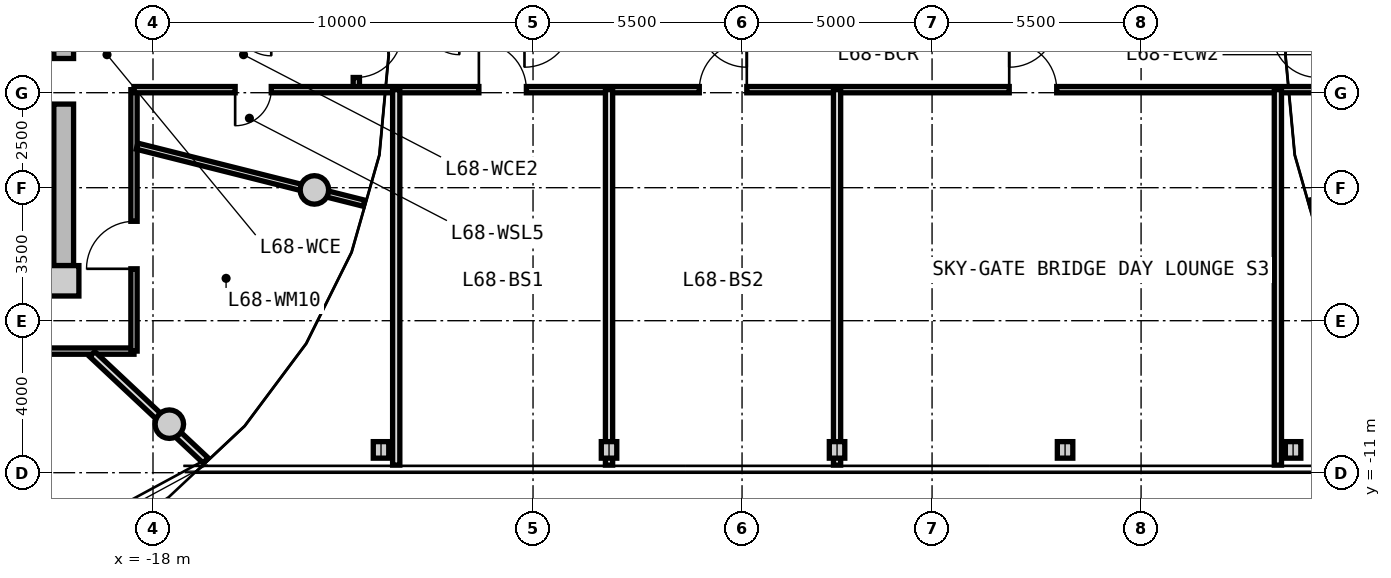
"""IFC4 building model, lengths in metres.
Left out: names, types, materials, properties, quantities, classifications, styles, units other than length and angle.
Written with IfcOpenShell. Run it as: python <this file> out.ifc"""

import sys

from ifc_helpers import new_model, si_unit, direction, frame, frame_2d, origin, origin_2d, place, context, subcontext, project, spatial, rectangle, circle, i_section, extrude, source, transform, mapped, element, fill, save


model = new_model("IFC4")
c1 = context("Model", 3, precision=1e-05, world=origin(), true_north=direction((0.0, 1.0)))
c2 = subcontext(c1, "Body", "Model", "MODEL_VIEW")
j1 = project(units=[si_unit("LENGTHUNIT", "METRE"), si_unit("PLANEANGLEUNIT", "RADIAN")], contexts=[c1])
p1 = place(None, origin())
s1 = spatial("IfcSite", under=j1, at=p1, CompositionType="ELEMENT")
p2 = place(p1, origin())
s2 = spatial("IfcBuilding", under=s1, at=p2, CompositionType="ELEMENT")
p3 = place(p2, frame((0.0, 0.0, 220.0)))
s3 = spatial("IfcBuildingStorey", under=s2, at=p3, CompositionType="ELEMENT", Elevation=220.0)
m1 = source(origin(), c2, "Body", "SweptSolid", [
    extrude(rectangle(XDim=0.8, YDim=0.8, at=origin_2d()), origin(), (0.0, 0.0, 1.0), 3.05),
])
p4 = place(p3, frame((-20.35, -5.95, 0.0), z_axis=(0.0, 0.0, 1.0), x_axis=(1.0, 0.0, 0.0)))
e1 = element("IfcColumn", 1, at=p4, inside=s3, PredefinedType="COLUMN", context=c2, shape_type="MappedRepresentation", body=[
    mapped(m1, transform((0.0, 0.0, 0.0), x_axis=(1.0, 0.0, 0.0), y_axis=(0.0, 1.0, 0.0), z_axis=(0.0, 0.0, 1.0), scale=1.0)),
])
m2 = source(origin(), c2, "Body", "SweptSolid", [
    extrude(rectangle(XDim=11.1, YDim=0.52, at=frame_2d((5.55, 0.0))), origin(), (0.0, 0.0, 1.0), 2.76),
])
p5 = place(p3, frame((-20.35, 5.55, 0.0), z_axis=(0.0, 0.0, 1.0), x_axis=(0.0, -1.0, 0.0)))
e2 = element("IfcWall", 2, at=p5, inside=s3, PredefinedType="SHEAR", context=c2, shape_type="MappedRepresentation", body=[
    mapped(m2, transform((0.0, 0.0, 0.0), x_axis=(1.0, 0.0, 0.0), y_axis=(0.0, 1.0, 0.0), z_axis=(0.0, 0.0, 1.0), scale=1.0)),
])
p6 = place(p5, frame((5.65, 0.0, 0.0)))
e3 = element("IfcOpeningElement", 3, at=p6, cuts=e2, PredefinedType="OPENING", context=c2, shape_type="SweptSolid", body=[
    extrude(rectangle(XDim=1.2, YDim=2.15, at=frame_2d((0.6, 1.075))), frame((0.0, 0.27, 0.0), z_axis=(0.0, -1.0, 0.0), x_axis=(1.0, 0.0, 0.0)), (0.0, 0.0, 1.0), 0.54),
])
m3 = source(origin(), c2, "Body", "SweptSolid", [
    extrude(circle(Radius=0.375, at=origin_2d()), origin(), (0.0, 0.0, 1.0), 3.05),
])
for number, where, z_axis, x_axis in (
    (4, (-17.57, -9.723, 0.0), (0.0, 0.0, 1.0), (1.0, 0.0, 0.0)),
    (5, (-13.753, -3.559, 0.0), (0.0, 0.0, 1.0), (1.0, 0.0, 0.0)),
):
    element("IfcColumn", number, at=place(p3, frame(where, z_axis=z_axis, x_axis=x_axis)), inside=s3, PredefinedType="COLUMN", context=c2, shape_type="MappedRepresentation", body=[
        mapped(m3, transform((0.0, 0.0, 0.0), x_axis=(1.0, 0.0, 0.0), y_axis=(0.0, 1.0, 0.0), z_axis=(0.0, 0.0, 1.0), scale=1.0)),
    ])
m4 = source(origin(), c2, "Body", "SweptSolid", [
    extrude(i_section(OverallWidth=0.407, OverallDepth=0.435, WebThickness=0.024, FlangeThickness=0.039, FilletRadius=0.015, at=origin_2d()), origin(), (0.0, 0.0, 1.0), 3.05),
])
for number, where, z_axis, x_axis in (
    (6, (-12.0, -10.4, 0.0), (0.0, 0.0, 1.0), (1.0, 0.0, 0.0)),
    (7, (-6.0, -10.4, 0.0), (0.0, 0.0, 1.0), (1.0, 0.0, 0.0)),
    (8, (0.0, -10.4, 0.0), (0.0, 0.0, 1.0), (1.0, 0.0, 0.0)),
    (9, (6.0, -10.4, 0.0), (0.0, 0.0, 1.0), (1.0, 0.0, 0.0)),
    (10, (12.0, -10.4, 0.0), (0.0, 0.0, 1.0), (1.0, 0.0, 0.0)),
):
    element("IfcColumn", number, at=place(p3, frame(where, z_axis=z_axis, x_axis=x_axis)), inside=s3, PredefinedType="COLUMN", context=c2, shape_type="MappedRepresentation", body=[
        mapped(m4, transform((0.0, 0.0, 0.0), x_axis=(1.0, 0.0, 0.0), y_axis=(0.0, 1.0, 0.0), z_axis=(0.0, 0.0, 1.0), scale=1.0)),
    ])
m5 = source(origin(), c2, "Body", "SweptSolid", [
    extrude(rectangle(XDim=19.0, YDim=0.165, at=frame_2d((9.5, 0.0))), origin(), (0.0, 0.0, 1.0), 2.745),
])
p7 = place(p3, frame((-18.5, -7.8, 0.0), z_axis=(0.0, 0.0, 1.0), x_axis=(-1.0, 0.0, 0.0)))
e11 = element("IfcWall", 11, at=p7, inside=s3, PredefinedType="PARTITIONING", context=c2, shape_type="MappedRepresentation", body=[
    mapped(m5, transform((0.0, 0.0, 0.0), x_axis=(1.0, 0.0, 0.0), y_axis=(0.0, 1.0, 0.0), z_axis=(0.0, 0.0, 1.0), scale=1.0)),
])
p8 = place(p7, frame((14.191, 0.0, 0.0)))
e12 = element("IfcOpeningElement", 12, at=p8, cuts=e11, PredefinedType="OPENING", context=c2, shape_type="SweptSolid", body=[
    extrude(rectangle(XDim=1.25, YDim=2.2, at=frame_2d((0.625, 1.1))), frame((0.0, 0.093, 0.0), z_axis=(0.0, -1.0, 0.0), x_axis=(1.0, 0.0, 0.0)), (0.0, 0.0, 1.0), 0.185),
])
p9 = place(p7, frame((8.875, 0.0, 0.0)))
e13 = element("IfcOpeningElement", 13, at=p9, cuts=e11, PredefinedType="OPENING", context=c2, shape_type="SweptSolid", body=[
    extrude(rectangle(XDim=1.25, YDim=2.2, at=frame_2d((0.625, 1.1))), frame((0.0, 0.093, 0.0), z_axis=(0.0, -1.0, 0.0), x_axis=(1.0, 0.0, 0.0)), (0.0, 0.0, 1.0), 0.185),
])
p10 = place(p7, frame((3.559, 0.0, 0.0)))
e14 = element("IfcOpeningElement", 14, at=p10, cuts=e11, PredefinedType="OPENING", context=c2, shape_type="SweptSolid", body=[
    extrude(rectangle(XDim=1.25, YDim=2.2, at=frame_2d((0.625, 1.1))), frame((0.0, 0.093, 0.0), z_axis=(0.0, -1.0, 0.0), x_axis=(1.0, 0.0, 0.0)), (0.0, 0.0, 1.0), 0.185),
])
m6 = source(origin(), c2, "Body", "SweptSolid", [
    extrude(rectangle(XDim=6.88, YDim=0.165, at=frame_2d((3.44, 0.0))), origin(), (0.0, 0.0, 1.0), 2.745),
])
p11 = place(p3, frame((-18.5, -0.92, 0.0), z_axis=(0.0, 0.0, 1.0), x_axis=(0.0, -1.0, 0.0)))
e15 = element("IfcWall", 15, at=p11, inside=s3, PredefinedType="PARTITIONING", context=c2, shape_type="MappedRepresentation", body=[
    mapped(m6, transform((0.0, 0.0, 0.0), x_axis=(1.0, 0.0, 0.0), y_axis=(0.0, 1.0, 0.0), z_axis=(0.0, 0.0, 1.0), scale=1.0)),
])
p12 = place(p11, frame((3.464, 0.0, 0.0)))
e16 = element("IfcOpeningElement", 16, at=p12, cuts=e15, PredefinedType="OPENING", context=c2, shape_type="SweptSolid", body=[
    extrude(rectangle(XDim=1.25, YDim=2.2, at=frame_2d((0.625, 1.1))), frame((0.0, 0.093, 0.0), z_axis=(0.0, -1.0, 0.0), x_axis=(1.0, 0.0, 0.0)), (0.0, 0.0, 1.0), 0.185),
])
m7 = source(origin(), c2, "Body", "SweptSolid", [
    extrude(rectangle(XDim=6.157, YDim=0.165, at=frame_2d((3.079, 0.0))), origin(), (0.0, 0.0, 1.0), 2.345),
])
p13 = place(p3, frame((-18.42, -2.407, 0.0), z_axis=(0.0, 0.0, 1.0), x_axis=(0.969840867184, -0.243738984038, 0.0)))
e17 = element("IfcWall", 17, at=p13, inside=s3, PredefinedType="PARTITIONING", context=c2, shape_type="MappedRepresentation", body=[
    mapped(m7, transform((0.0, 0.0, 0.0), x_axis=(1.0, 0.0, 0.0), y_axis=(0.0, 1.0, 0.0), z_axis=(0.0, 0.0, 1.0), scale=1.0)),
])
m8 = source(origin(), c2, "Body", "SweptSolid", [
    extrude(rectangle(XDim=4.089, YDim=0.19, at=frame_2d((2.044, 0.0))), origin(), (0.0, 0.0, 1.0), 2.345),
])
p14 = place(p3, frame((-19.598, -7.88, 0.0), z_axis=(0.0, 0.0, 1.0), x_axis=(0.729401273609, -0.684086092577, 0.0)))
e18 = element("IfcWall", 18, at=p14, inside=s3, PredefinedType="PARTITIONING", context=c2, shape_type="MappedRepresentation", body=[
    mapped(m8, transform((0.0, 0.0, 0.0), x_axis=(1.0, 0.0, 0.0), y_axis=(0.0, 1.0, 0.0), z_axis=(0.0, 0.0, 1.0), scale=1.0)),
])
p15 = place(p3, frame((18.42, -2.407, 0.0), z_axis=(0.0, 0.0, 1.0), x_axis=(-0.969840867184, -0.243738984038, 0.0)))
e19 = element("IfcWall", 19, at=p15, inside=s3, PredefinedType="PARTITIONING", context=c2, shape_type="MappedRepresentation", body=[
    mapped(m7, transform((0.0, 0.0, 0.0), x_axis=(1.0, 0.0, 0.0), y_axis=(0.0, 1.0, 0.0), z_axis=(0.0, 0.0, 1.0), scale=1.0)),
])
m9 = source(origin(), c2, "Body", "SweptSolid", [
    extrude(rectangle(XDim=1.84, YDim=0.165, at=frame_2d((0.92, 0.0))), origin(), (0.0, 0.0, 1.0), 2.745),
])
p16 = place(p3, frame((-12.65, -0.92, 0.0), z_axis=(0.0, 0.0, 1.0), x_axis=(0.0, 1.0, 0.0)))
e20 = element("IfcWall", 20, at=p16, inside=s3, PredefinedType="PARTITIONING", context=c2, shape_type="MappedRepresentation", body=[
    mapped(m9, transform((0.0, 0.0, 0.0), x_axis=(1.0, 0.0, 0.0), y_axis=(0.0, 1.0, 0.0), z_axis=(0.0, 0.0, 1.0), scale=1.0)),
])
p17 = place(p16, frame((0.32, 0.0, 0.0)))
e21 = element("IfcOpeningElement", 21, at=p17, cuts=e20, PredefinedType="OPENING", context=c2, shape_type="SweptSolid", body=[
    extrude(rectangle(XDim=1.2, YDim=2.15, at=frame_2d((0.6, 1.075))), frame((0.0, 0.093, 0.0), z_axis=(0.0, -1.0, 0.0), x_axis=(1.0, 0.0, 0.0)), (0.0, 0.0, 1.0), 0.185),
])
m10 = source(origin(), c2, "Body", "SweptSolid", [
    extrude(rectangle(XDim=37.0, YDim=0.165, at=frame_2d((18.5, 0.0))), origin(), (0.0, 0.0, 1.0), 2.745),
])
p18 = place(p3, frame((-18.5, -0.92, 0.0), z_axis=(0.0, 0.0, 1.0), x_axis=(1.0, 0.0, 0.0)))
e22 = element("IfcWall", 22, at=p18, inside=s3, PredefinedType="PARTITIONING", context=c2, shape_type="MappedRepresentation", body=[
    mapped(m10, transform((0.0, 0.0, 0.0), x_axis=(1.0, 0.0, 0.0), y_axis=(0.0, 1.0, 0.0), z_axis=(0.0, 0.0, 1.0), scale=1.0)),
])
p19 = place(p18, frame((2.662, 0.0, 0.0)))
e23 = element("IfcOpeningElement", 23, at=p19, cuts=e22, PredefinedType="OPENING", context=c2, shape_type="SweptSolid", body=[
    extrude(rectangle(XDim=0.95, YDim=2.1, at=frame_2d((0.475, 1.05))), frame((0.0, 0.093, 0.0), z_axis=(0.0, -1.0, 0.0), x_axis=(1.0, 0.0, 0.0)), (0.0, 0.0, 1.0), 0.185),
])
p20 = place(p18, frame((33.388, 0.0, 0.0)))
e24 = element("IfcOpeningElement", 24, at=p20, cuts=e22, PredefinedType="OPENING", context=c2, shape_type="SweptSolid", body=[
    extrude(rectangle(XDim=0.95, YDim=2.1, at=frame_2d((0.475, 1.05))), frame((0.0, 0.093, 0.0), z_axis=(0.0, -1.0, 0.0), x_axis=(1.0, 0.0, 0.0)), (0.0, 0.0, 1.0), 0.185),
])
p21 = place(p18, frame((9.075, 0.0, 0.0)))
e25 = element("IfcOpeningElement", 25, at=p21, cuts=e22, PredefinedType="OPENING", context=c2, shape_type="SweptSolid", body=[
    extrude(rectangle(XDim=1.25, YDim=2.2, at=frame_2d((0.625, 1.1))), frame((0.0, 0.093, 0.0), z_axis=(0.0, -1.0, 0.0), x_axis=(1.0, 0.0, 0.0)), (0.0, 0.0, 1.0), 0.185),
])
p22 = place(p18, frame((14.875, 0.0, 0.0)))
e26 = element("IfcOpeningElement", 26, at=p22, cuts=e22, PredefinedType="OPENING", context=c2, shape_type="SweptSolid", body=[
    extrude(rectangle(XDim=1.25, YDim=2.2, at=frame_2d((0.625, 1.1))), frame((0.0, 0.093, 0.0), z_axis=(0.0, -1.0, 0.0), x_axis=(1.0, 0.0, 0.0)), (0.0, 0.0, 1.0), 0.185),
])
p23 = place(p18, frame((23.03, 0.0, 0.0)))
e27 = element("IfcOpeningElement", 27, at=p23, cuts=e22, PredefinedType="OPENING", context=c2, shape_type="SweptSolid", body=[
    extrude(rectangle(XDim=1.25, YDim=2.2, at=frame_2d((0.625, 1.1))), frame((0.0, 0.093, 0.0), z_axis=(0.0, -1.0, 0.0), x_axis=(1.0, 0.0, 0.0)), (0.0, 0.0, 1.0), 0.185),
])
m11 = source(origin(), c2, "Body", "SweptSolid", [
    extrude(rectangle(XDim=9.88, YDim=0.19, at=frame_2d((4.94, 0.0))), origin(), (0.0, 0.0, 1.0), 2.745),
])
for number, where, z_axis, x_axis in (
    (28, (-11.6, -10.8, 0.0), (0.0, 0.0, 1.0), (0.0, 1.0, 0.0)),
    (29, (11.6, -10.8, 0.0), (0.0, 0.0, 1.0), (0.0, 1.0, 0.0)),
):
    element("IfcWall", number, at=place(p3, frame(where, z_axis=z_axis, x_axis=x_axis)), inside=s3, PredefinedType="PARTITIONING", context=c2, shape_type="MappedRepresentation", body=[
        mapped(m11, transform((0.0, 0.0, 0.0), x_axis=(1.0, 0.0, 0.0), y_axis=(0.0, 1.0, 0.0), z_axis=(0.0, 0.0, 1.0), scale=1.0)),
    ])
m12 = source(origin(), c2, "Body", "SweptSolid", [
    extrude(rectangle(XDim=9.88, YDim=0.19, at=frame_2d((4.94, 0.0))), origin(), (0.0, 0.0, 1.0), 2.045),
])
for number, where, z_axis, x_axis in (
    (30, (-6.0, -10.8, 0.0), (0.0, 0.0, 1.0), (0.0, 1.0, 0.0)),
    (31, (0.0, -10.8, 0.0), (0.0, 0.0, 1.0), (0.0, 1.0, 0.0)),
):
    element("IfcWall", number, at=place(p3, frame(where, z_axis=z_axis, x_axis=x_axis)), inside=s3, PredefinedType="PARTITIONING", context=c2, shape_type="MappedRepresentation", body=[
        mapped(m12, transform((0.0, 0.0, 0.0), x_axis=(1.0, 0.0, 0.0), y_axis=(0.0, 1.0, 0.0), z_axis=(0.0, 0.0, 1.0), scale=1.0)),
    ])
m13 = source(origin(), c2, "Body", "SweptSolid", [
    extrude(rectangle(XDim=1.2, YDim=2.15, at=frame_2d((0.6, 1.075))), frame((0.0, 0.025, 0.0), z_axis=(0.0, -1.0, 0.0), x_axis=(1.0, 0.0, 0.0)), (0.0, 0.0, 1.0), 0.05),
])
p24 = place(p6, frame((1.2, 0.0, 0.0), z_axis=(0.0, 0.0, 1.0), x_axis=(-1.0, 0.0, 0.0)))
e32 = element("IfcDoor", 32, at=p24, inside=s3, OperationType="SINGLE_SWING_RIGHT", PredefinedType="DOOR", context=c2, shape_type="MappedRepresentation", body=[
    mapped(m13, transform((0.0, 0.0, 0.0), x_axis=(1.0, 0.0, 0.0), y_axis=(0.0, 1.0, 0.0), z_axis=(0.0, 0.0, 1.0), scale=1.0)),
])
fill(e3, e32)
m14 = source(origin(), c2, "Body", "SweptSolid", [
    extrude(rectangle(XDim=0.95, YDim=2.1, at=frame_2d((0.475, 1.05))), frame((0.0, 0.025, 0.0), z_axis=(0.0, -1.0, 0.0), x_axis=(1.0, 0.0, 0.0)), (0.0, 0.0, 1.0), 0.05),
])
p25 = place(p19, frame((0.95, 0.0, 0.0), z_axis=(0.0, 0.0, 1.0), x_axis=(-1.0, 0.0, 0.0)))
e33 = element("IfcDoor", 33, at=p25, inside=s3, OperationType="SINGLE_SWING_RIGHT", PredefinedType="DOOR", context=c2, shape_type="MappedRepresentation", body=[
    mapped(m14, transform((0.0, 0.0, 0.0), x_axis=(1.0, 0.0, 0.0), y_axis=(0.0, 1.0, 0.0), z_axis=(0.0, 0.0, 1.0), scale=1.0)),
])
fill(e23, e33)
m15 = source(origin(), c2, "Body", "SweptSolid", [
    extrude(rectangle(XDim=1.25, YDim=2.2, at=frame_2d((0.625, 1.1))), frame((0.0, 0.025, 0.0), z_axis=(0.0, -1.0, 0.0), x_axis=(1.0, 0.0, 0.0)), (0.0, 0.0, 1.0), 0.05),
])
p26 = place(p12, frame((1.25, 0.0, 0.0), z_axis=(0.0, 0.0, 1.0), x_axis=(-1.0, 0.0, 0.0)))
e34 = element("IfcDoor", 34, at=p26, inside=s3, OperationType="SINGLE_SWING_LEFT", PredefinedType="DOOR", context=c2, shape_type="MappedRepresentation", body=[
    mapped(m15, transform((0.0, 0.0, 0.0), x_axis=(1.0, 0.0, 0.0), y_axis=(0.0, 1.0, 0.0), z_axis=(0.0, 0.0, 1.0), scale=1.0)),
])
fill(e16, e34)
p27 = place(p17, frame((1.2, 0.0, 0.0), z_axis=(0.0, 0.0, 1.0), x_axis=(-1.0, 0.0, 0.0)))
e35 = element("IfcDoor", 35, at=p27, inside=s3, OperationType="SINGLE_SWING_LEFT", PredefinedType="DOOR", context=c2, shape_type="MappedRepresentation", body=[
    mapped(m13, transform((0.0, 0.0, 0.0), x_axis=(1.0, 0.0, 0.0), y_axis=(0.0, 1.0, 0.0), z_axis=(0.0, 0.0, 1.0), scale=1.0)),
])
fill(e21, e35)
p28 = place(p21, origin())
e36 = element("IfcDoor", 36, at=p28, inside=s3, OperationType="SINGLE_SWING_LEFT", PredefinedType="DOOR", context=c2, shape_type="MappedRepresentation", body=[
    mapped(m15, transform((0.0, 0.0, 0.0), x_axis=(1.0, 0.0, 0.0), y_axis=(0.0, 1.0, 0.0), z_axis=(0.0, 0.0, 1.0), scale=1.0)),
])
fill(e25, e36)
p29 = place(p22, origin())
e37 = element("IfcDoor", 37, at=p29, inside=s3, OperationType="SINGLE_SWING_RIGHT", PredefinedType="DOOR", context=c2, shape_type="MappedRepresentation", body=[
    mapped(m15, transform((0.0, 0.0, 0.0), x_axis=(1.0, 0.0, 0.0), y_axis=(0.0, 1.0, 0.0), z_axis=(0.0, 0.0, 1.0), scale=1.0)),
])
fill(e26, e37)
p30 = place(p23, origin())
e38 = element("IfcDoor", 38, at=p30, inside=s3, OperationType="SINGLE_SWING_LEFT", PredefinedType="DOOR", context=c2, shape_type="MappedRepresentation", body=[
    mapped(m15, transform((0.0, 0.0, 0.0), x_axis=(1.0, 0.0, 0.0), y_axis=(0.0, 1.0, 0.0), z_axis=(0.0, 0.0, 1.0), scale=1.0)),
])
fill(e27, e38)
save(model, sys.argv[1])
